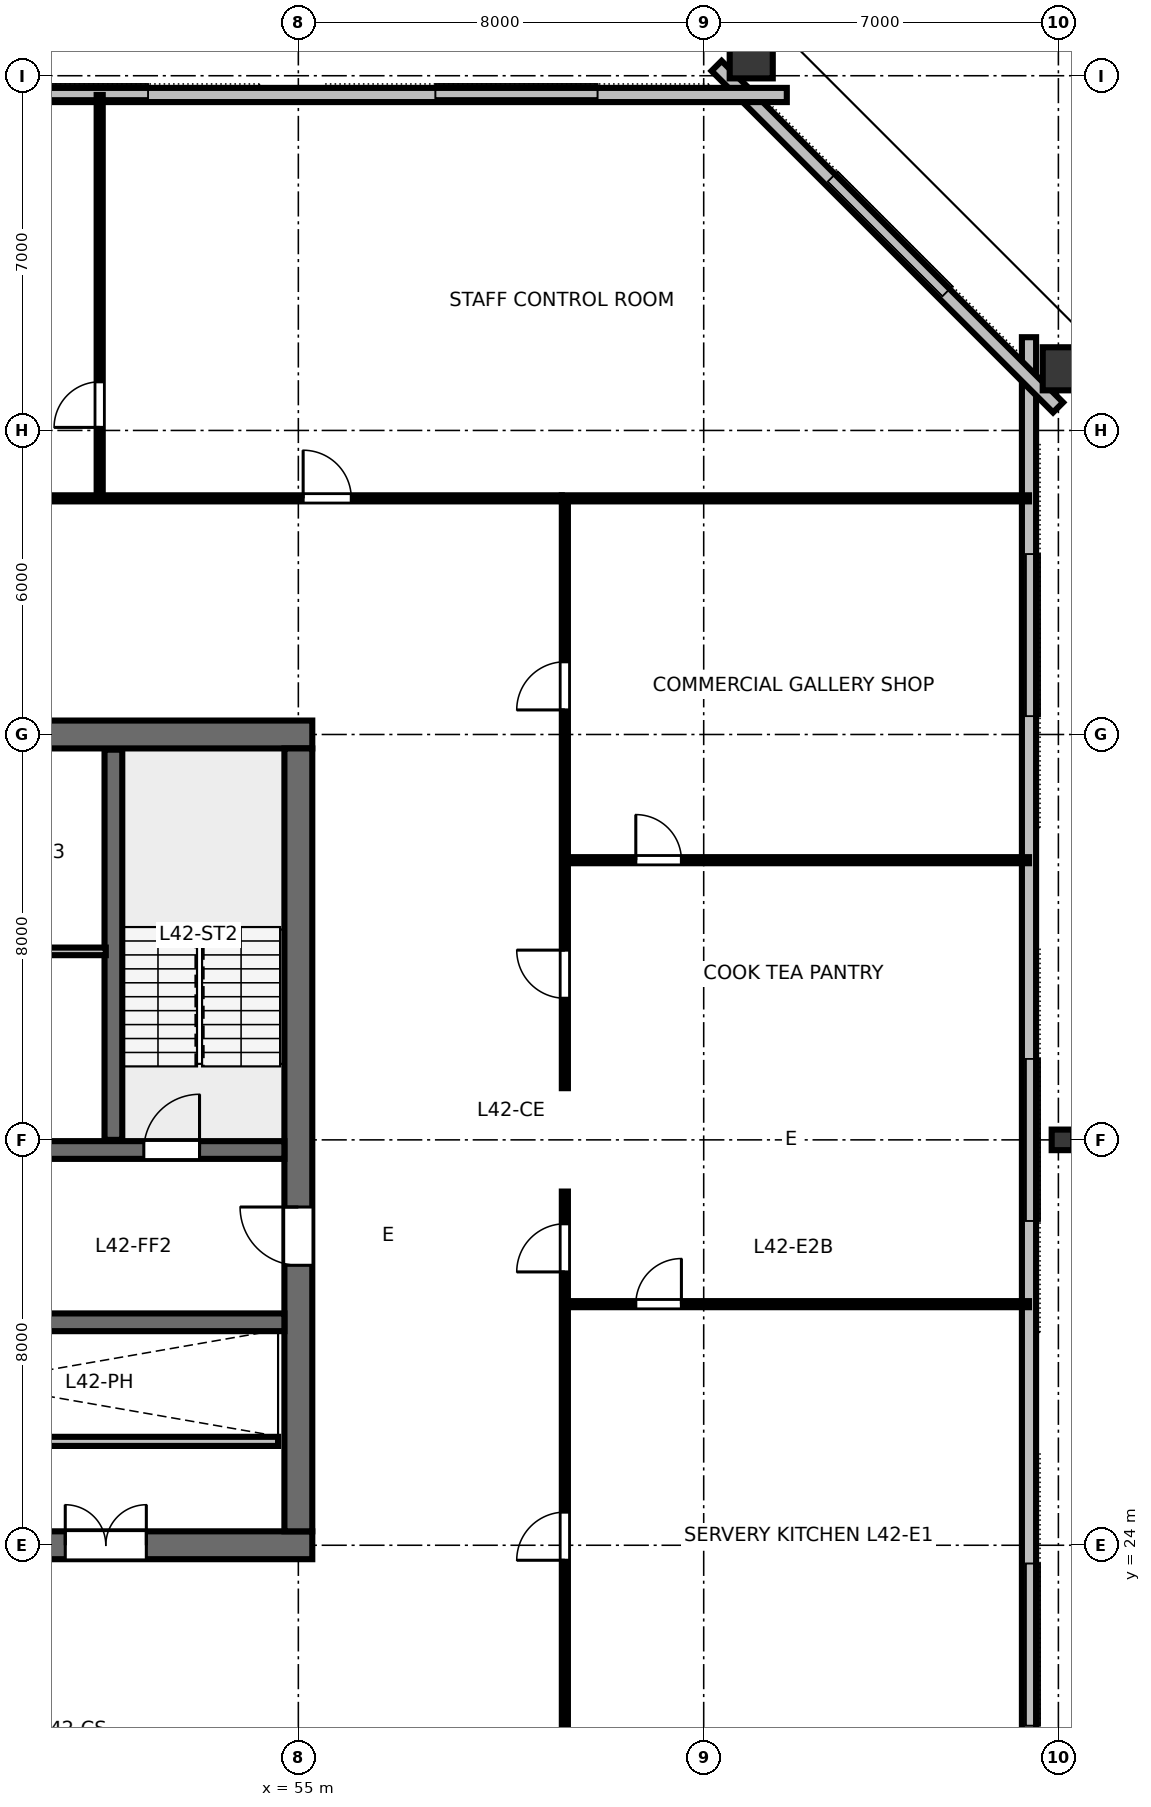
"""IFC4 building model, lengths in metres.
Left out: names, types, materials, properties, quantities, classifications, styles, units other than length and angle.
Written with IfcOpenShell. Run it as: python <this file> out.ifc"""

import sys

from ifc_helpers import new_model, si_unit, direction, frame, frame_2d, origin, origin_2d, place, context, subcontext, project, spatial, rectangle, hollow_rectangle, i_section, extrude, element, fill, save


model = new_model("IFC4")
c1 = context("Model", 3, precision=1e-05, world=origin(), true_north=direction((0.0, 1.0)))
c2 = subcontext(c1, "Body", "Model", "MODEL_VIEW")
j1 = project(units=[si_unit("LENGTHUNIT", "METRE"), si_unit("PLANEANGLEUNIT", "RADIAN")], contexts=[c1])
p1 = place(None, origin())
s1 = spatial("IfcSite", under=j1, at=p1, CompositionType="ELEMENT")
p2 = place(p1, origin())
s2 = spatial("IfcBuilding", under=s1, at=p2, CompositionType="ELEMENT")
p3 = place(p2, frame((0.0, 0.0, 160.0)))
s3 = spatial("IfcBuildingStorey", under=s2, at=p3, CompositionType="ELEMENT", Elevation=160.0)
p4 = place(p3, frame((36.725, 24.0, 0.0), z_axis=(0.0, 0.0, 1.0), x_axis=(1.0, 0.0, 0.0)))
e1 = element("IfcWall", 1, at=p4, inside=s3, PredefinedType="SHEAR", context=c2, shape_type="SweptSolid", body=[
    extrude(rectangle(XDim=18.55, YDim=0.55, at=frame_2d((9.275, 0.0))), origin(), (0.0, 0.0, 1.0), 3.36),
])
p5 = place(p4, frame((8.275, 0.0, 0.0)))
e2 = element("IfcOpeningElement", 2, at=p5, cuts=e1, PredefinedType="OPENING", context=c2, shape_type="SweptSolid", body=[
    extrude(rectangle(XDim=1.6, YDim=2.15, at=frame_2d((0.8, 1.075))), frame((0.0, 0.285, 0.0), z_axis=(0.0, -1.0, 0.0), x_axis=(1.0, 0.0, 0.0)), (0.0, 0.0, 1.0), 0.57),
])
p6 = place(p4, frame((13.675, 0.0, 0.0)))
e3 = element("IfcOpeningElement", 3, at=p6, cuts=e1, PredefinedType="OPENING", context=c2, shape_type="SweptSolid", body=[
    extrude(rectangle(XDim=1.6, YDim=2.15, at=frame_2d((0.8, 1.075))), frame((0.0, 0.285, 0.0), z_axis=(0.0, -1.0, 0.0), x_axis=(1.0, 0.0, 0.0)), (0.0, 0.0, 1.0), 0.57),
])
p7 = place(p3, frame((36.725, 40.0, 0.0), z_axis=(0.0, 0.0, 1.0), x_axis=(1.0, 0.0, 0.0)))
e4 = element("IfcWall", 4, at=p7, inside=s3, PredefinedType="SHEAR", context=c2, shape_type="SweptSolid", body=[
    extrude(rectangle(XDim=18.55, YDim=0.55, at=frame_2d((9.275, 0.0))), origin(), (0.0, 0.0, 1.0), 3.36),
])
p8 = place(p7, frame((8.775, 0.0, 0.0)))
e5 = element("IfcOpeningElement", 5, at=p8, cuts=e4, PredefinedType="OPENING", context=c2, shape_type="SweptSolid", body=[
    extrude(rectangle(XDim=1.0, YDim=2.15, at=frame_2d((0.5, 1.075))), frame((0.0, 0.285, 0.0), z_axis=(0.0, -1.0, 0.0), x_axis=(1.0, 0.0, 0.0)), (0.0, 0.0, 1.0), 0.57),
])
p9 = place(p3, frame((55.0, 24.275, 0.0), z_axis=(0.0, 0.0, 1.0), x_axis=(0.0, 1.0, 0.0)))
e6 = element("IfcWall", 6, at=p9, inside=s3, PredefinedType="SHEAR", context=c2, shape_type="SweptSolid", body=[
    extrude(rectangle(XDim=15.45, YDim=0.55, at=frame_2d((7.725, 0.0))), origin(), (0.0, 0.0, 1.0), 3.36),
])
p10 = place(p9, frame((5.25, 0.0, 0.0)))
e7 = element("IfcOpeningElement", 7, at=p10, cuts=e6, PredefinedType="OPENING", context=c2, shape_type="SweptSolid", body=[
    extrude(rectangle(XDim=1.15, YDim=2.15, at=frame_2d((0.575, 1.075))), frame((0.0, 0.285, 0.0), z_axis=(0.0, -1.0, 0.0), x_axis=(1.0, 0.0, 0.0)), (0.0, 0.0, 1.0), 0.57),
])
p11 = place(p3, frame((37.275, 31.8, 0.0), z_axis=(0.0, 0.0, 1.0), x_axis=(1.0, 0.0, 0.0)))
e8 = element("IfcWall", 8, at=p11, inside=s3, PredefinedType="SHEAR", context=c2, shape_type="SweptSolid", body=[
    extrude(rectangle(XDim=17.45, YDim=0.35, at=frame_2d((8.725, 0.0))), origin(), (0.0, 0.0, 1.0), 3.36),
])
p12 = place(p11, frame((0.775, 0.0, 0.0)))
e9 = element("IfcOpeningElement", 9, at=p12, cuts=e8, PredefinedType="OPENING", context=c2, shape_type="SweptSolid", body=[
    extrude(rectangle(XDim=1.1, YDim=2.15, at=frame_2d((0.55, 1.075))), frame((0.0, 0.185, 0.0), z_axis=(0.0, -1.0, 0.0), x_axis=(1.0, 0.0, 0.0)), (0.0, 0.0, 1.0), 0.37),
])
p13 = place(p11, frame((14.675, 0.0, 0.0)))
e10 = element("IfcOpeningElement", 10, at=p13, cuts=e8, PredefinedType="OPENING", context=c2, shape_type="SweptSolid", body=[
    extrude(rectangle(XDim=1.1, YDim=2.15, at=frame_2d((0.55, 1.075))), frame((0.0, 0.185, 0.0), z_axis=(0.0, -1.0, 0.0), x_axis=(1.0, 0.0, 0.0)), (0.0, 0.0, 1.0), 0.37),
])
p14 = place(p3, frame((37.275, 28.4, 0.0), z_axis=(0.0, 0.0, 1.0), x_axis=(1.0, 0.0, 0.0)))
e11 = element("IfcWall", 11, at=p14, inside=s3, PredefinedType="SHEAR", context=c2, shape_type="SweptSolid", body=[
    extrude(rectangle(XDim=17.45, YDim=0.35, at=frame_2d((8.725, 0.0))), origin(), (0.0, 0.0, 1.0), 3.36),
])
p15 = place(p3, frame((70.08, 32.0, 0.0), z_axis=(0.0, 0.0, 1.0), x_axis=(0.0, 1.0, 0.0)))
e12 = element("IfcColumn", 12, at=p15, inside=s3, PredefinedType="COLUMN", context=c2, shape_type="SweptSolid", body=[
    extrude(i_section(OverallWidth=0.406, OverallDepth=0.425, WebThickness=0.033, FlangeThickness=0.052, FilletRadius=0.025, at=origin_2d()), origin(), (0.0, 0.0, 1.0), 3.358),
])
for number, where, z_axis, x_axis in (
    (13, (70.19, 47.217, 0.0), (0.0, 0.0, 1.0), (0.0, 1.0, 0.0)),
    (14, (63.938, 53.448, 0.0), (0.0, 0.0, 1.0), (1.0, 0.0, 0.0)),
):
    element("IfcColumn", number, at=place(p3, frame(where, z_axis=z_axis, x_axis=x_axis)), inside=s3, PredefinedType="COLUMN", context=c2, shape_type="SweptSolid", body=[
        extrude(hollow_rectangle(XDim=0.85, YDim=1.0, WallThickness=0.05, at=origin_2d()), origin(), (0.0, 0.0, 1.0), 3.358),
    ])
p16 = place(p3, frame((69.42, 16.16, 0.0), z_axis=(0.0, 0.0, 1.0), x_axis=(0.0, 1.0, 0.0)))
e15 = element("IfcWall", 15, at=p16, inside=s3, PredefinedType="STANDARD", context=c2, shape_type="SweptSolid", body=[
    extrude(rectangle(XDim=31.68, YDim=0.28, at=frame_2d((15.84, 0.0))), origin(), (0.0, 0.0, 1.0), 3.36),
])
p17 = place(p3, frame((69.994, 46.455, 0.0), z_axis=(0.0, 0.0, 1.0), x_axis=(-0.707119588888, 0.707093973253, 0.0)))
e16 = element("IfcWall", 16, at=p17, inside=s3, PredefinedType="STANDARD", context=c2, shape_type="SweptSolid", body=[
    extrude(rectangle(XDim=9.531, YDim=0.28, at=frame_2d((4.766, 0.0))), origin(), (0.0, 0.0, 1.0), 3.36),
])
p18 = place(p3, frame((64.64, 52.62, 0.0), z_axis=(0.0, 0.0, 1.0), x_axis=(-1.0, 0.0, 0.0)))
e17 = element("IfcWall", 17, at=p18, inside=s3, PredefinedType="STANDARD", context=c2, shape_type="SweptSolid", body=[
    extrude(rectangle(XDim=37.28, YDim=0.28, at=frame_2d((18.64, 0.0))), origin(), (0.0, 0.0, 1.0), 3.36),
])
p19 = place(p3, frame((51.35, 32.0, 0.0), z_axis=(0.0, 0.0, 1.0), x_axis=(0.0, 1.0, 0.0)))
e18 = element("IfcWall", 18, at=p19, inside=s3, PredefinedType="SHEAR", context=c2, shape_type="SweptSolid", body=[
    extrude(rectangle(XDim=7.7, YDim=0.35, at=frame_2d((3.85, 0.0))), origin(), (0.0, 0.0, 1.0), 3.6),
])
p20 = place(p3, frame((40.8, 35.72, 0.0), z_axis=(0.0, 0.0, 1.0), x_axis=(1.0, 0.0, 0.0)))
e19 = element("IfcWall", 19, at=p20, inside=s3, PredefinedType="PARTITIONING", context=c2, shape_type="SweptSolid", body=[
    extrude(rectangle(XDim=10.4, YDim=0.15, at=frame_2d((5.2, 0.0))), origin(), (0.0, 0.0, 1.0), 3.36),
])
p21 = place(p20, frame((4.9, 0.0, 0.0)))
e20 = element("IfcOpeningElement", 20, at=p21, cuts=e19, PredefinedType="OPENING", context=c2, shape_type="SweptSolid", body=[
    extrude(rectangle(XDim=0.9, YDim=2.15, at=frame_2d((0.45, 1.075))), frame((0.0, 0.085, 0.0), z_axis=(0.0, -1.0, 0.0), x_axis=(1.0, 0.0, 0.0)), (0.0, 0.0, 1.0), 0.17),
])
p22 = place(p3, frame((42.55, 26.05, 0.0), z_axis=(0.0, 0.0, 1.0), x_axis=(1.0, 0.0, 0.0)))
e21 = element("IfcWall", 21, at=p22, inside=s3, PredefinedType="PARTITIONING", context=c2, shape_type="SweptSolid", body=[
    extrude(rectangle(XDim=12.05, YDim=0.18, at=frame_2d((6.025, 0.0))), origin(), (0.0, 0.0, 1.0), 3.36),
])
p23 = place(p22, frame((1.1, 0.0, 0.0)))
e22 = element("IfcOpeningElement", 22, at=p23, cuts=e21, PredefinedType="OPENING", context=c2, shape_type="SweptSolid", body=[
    extrude(rectangle(XDim=1.05, YDim=2.15, at=frame_2d((0.525, 1.075))), frame((0.0, 0.1, 0.0), z_axis=(0.0, -1.0, 0.0), x_axis=(1.0, 0.0, 0.0)), (0.0, 0.0, 1.0), 0.2),
])
p24 = place(p22, frame((3.0, 0.0, 0.0)))
e23 = element("IfcOpeningElement", 23, at=p24, cuts=e21, PredefinedType="OPENING", context=c2, shape_type="SweptSolid", body=[
    extrude(rectangle(XDim=1.05, YDim=2.15, at=frame_2d((0.525, 1.075))), frame((0.0, 0.1, 0.0), z_axis=(0.0, -1.0, 0.0), x_axis=(1.0, 0.0, 0.0)), (0.0, 0.0, 1.0), 0.2),
])
p25 = place(p3, frame((51.08, 44.66, 0.0), z_axis=(0.0, 0.0, 1.0), x_axis=(0.0, 1.0, 0.0)))
e24 = element("IfcWall", 24, at=p25, inside=s3, PredefinedType="PARTITIONING", context=c2, shape_type="SweptSolid", body=[
    extrude(rectangle(XDim=7.96, YDim=0.12, at=frame_2d((3.98, 0.0))), origin(), (0.0, 0.0, 1.0), 2.64),
])
p26 = place(p25, frame((1.4, 0.0, 0.0)))
e25 = element("IfcOpeningElement", 25, at=p26, cuts=e24, PredefinedType="OPENING", context=c2, shape_type="SweptSolid", body=[
    extrude(rectangle(XDim=0.9, YDim=2.15, at=frame_2d((0.45, 1.075))), frame((0.0, 0.07, 0.0), z_axis=(0.0, -1.0, 0.0), x_axis=(1.0, 0.0, 0.0)), (0.0, 0.0, 1.0), 0.14),
])
p27 = place(p3, frame((31.8, 44.66, 0.0), z_axis=(0.0, 0.0, 1.0), x_axis=(1.0, 0.0, 0.0)))
e26 = element("IfcWall", 26, at=p27, inside=s3, PredefinedType="PARTITIONING", context=c2, shape_type="SweptSolid", body=[
    extrude(rectangle(XDim=28.4, YDim=0.12, at=frame_2d((14.2, 0.0))), origin(), (0.0, 0.0, 1.0), 2.64),
])
p28 = place(p27, frame((3.03, 0.0, 0.0)))
e27 = element("IfcOpeningElement", 27, at=p28, cuts=e26, PredefinedType="OPENING", context=c2, shape_type="SweptSolid", body=[
    extrude(rectangle(XDim=0.95, YDim=2.15, at=frame_2d((0.475, 1.075))), frame((0.0, 0.07, 0.0), z_axis=(0.0, -1.0, 0.0), x_axis=(1.0, 0.0, 0.0)), (0.0, 0.0, 1.0), 0.14),
])
p29 = place(p27, frame((8.077, 0.0, 0.0)))
e28 = element("IfcOpeningElement", 28, at=p29, cuts=e26, PredefinedType="OPENING", context=c2, shape_type="SweptSolid", body=[
    extrude(rectangle(XDim=0.95, YDim=2.15, at=frame_2d((0.475, 1.075))), frame((0.0, 0.07, 0.0), z_axis=(0.0, -1.0, 0.0), x_axis=(1.0, 0.0, 0.0)), (0.0, 0.0, 1.0), 0.14),
])
p30 = place(p27, frame((12.396, 0.0, 0.0)))
e29 = element("IfcOpeningElement", 29, at=p30, cuts=e26, PredefinedType="OPENING", context=c2, shape_type="SweptSolid", body=[
    extrude(rectangle(XDim=0.95, YDim=2.15, at=frame_2d((0.475, 1.075))), frame((0.0, 0.07, 0.0), z_axis=(0.0, -1.0, 0.0), x_axis=(1.0, 0.0, 0.0)), (0.0, 0.0, 1.0), 0.14),
])
p31 = place(p27, frame((16.918, 0.0, 0.0)))
e30 = element("IfcOpeningElement", 30, at=p31, cuts=e26, PredefinedType="OPENING", context=c2, shape_type="SweptSolid", body=[
    extrude(rectangle(XDim=0.95, YDim=2.15, at=frame_2d((0.475, 1.075))), frame((0.0, 0.07, 0.0), z_axis=(0.0, -1.0, 0.0), x_axis=(1.0, 0.0, 0.0)), (0.0, 0.0, 1.0), 0.14),
])
p32 = place(p27, frame((23.295, 0.0, 0.0)))
e31 = element("IfcOpeningElement", 31, at=p32, cuts=e26, PredefinedType="OPENING", context=c2, shape_type="SweptSolid", body=[
    extrude(rectangle(XDim=0.95, YDim=2.15, at=frame_2d((0.475, 1.075))), frame((0.0, 0.07, 0.0), z_axis=(0.0, -1.0, 0.0), x_axis=(1.0, 0.0, 0.0)), (0.0, 0.0, 1.0), 0.14),
])
p33 = place(p3, frame((60.26, 28.758, 0.0), z_axis=(0.0, 0.0, 1.0), x_axis=(1.0, 0.0, 0.0)))
e32 = element("IfcWall", 32, at=p33, inside=s3, PredefinedType="PARTITIONING", context=c2, shape_type="SweptSolid", body=[
    extrude(rectangle(XDim=9.16, YDim=0.12, at=frame_2d((4.58, 0.0))), origin(), (0.0, 0.0, 1.0), 2.64),
])
p34 = place(p33, frame((1.4, 0.0, 0.0)))
e33 = element("IfcOpeningElement", 33, at=p34, cuts=e32, PredefinedType="OPENING", context=c2, shape_type="SweptSolid", body=[
    extrude(rectangle(XDim=0.9, YDim=2.15, at=frame_2d((0.45, 1.075))), frame((0.0, 0.07, 0.0), z_axis=(0.0, -1.0, 0.0), x_axis=(1.0, 0.0, 0.0)), (0.0, 0.0, 1.0), 0.14),
])
p35 = place(p3, frame((60.26, 37.519, 0.0), z_axis=(0.0, 0.0, 1.0), x_axis=(1.0, 0.0, 0.0)))
e34 = element("IfcWall", 34, at=p35, inside=s3, PredefinedType="PARTITIONING", context=c2, shape_type="SweptSolid", body=[
    extrude(rectangle(XDim=9.16, YDim=0.12, at=frame_2d((4.58, 0.0))), origin(), (0.0, 0.0, 1.0), 2.64),
])
p36 = place(p35, frame((1.4, 0.0, 0.0)))
e35 = element("IfcOpeningElement", 35, at=p36, cuts=e34, PredefinedType="OPENING", context=c2, shape_type="SweptSolid", body=[
    extrude(rectangle(XDim=0.9, YDim=2.15, at=frame_2d((0.45, 1.075))), frame((0.0, 0.07, 0.0), z_axis=(0.0, -1.0, 0.0), x_axis=(1.0, 0.0, 0.0)), (0.0, 0.0, 1.0), 0.14),
])
p37 = place(p3, frame((60.26, 19.4, 0.0), z_axis=(0.0, 0.0, 1.0), x_axis=(0.0, 1.0, 0.0)))
e36 = element("IfcWall", 36, at=p37, inside=s3, PredefinedType="PARTITIONING", context=c2, shape_type="SweptSolid", body=[
    extrude(rectangle(XDim=11.58, YDim=0.12, at=frame_2d((5.79, 0.0))), origin(), (0.0, 0.0, 1.0), 2.64),
])
p38 = place(p37, frame((4.304, 0.0, 0.0)))
e37 = element("IfcOpeningElement", 37, at=p38, cuts=e36, PredefinedType="OPENING", context=c2, shape_type="SweptSolid", body=[
    extrude(rectangle(XDim=0.95, YDim=2.15, at=frame_2d((0.475, 1.075))), frame((0.0, 0.07, 0.0), z_axis=(0.0, -1.0, 0.0), x_axis=(1.0, 0.0, 0.0)), (0.0, 0.0, 1.0), 0.14),
])
p39 = place(p37, frame((9.994, 0.0, 0.0)))
e38 = element("IfcOpeningElement", 38, at=p39, cuts=e36, PredefinedType="OPENING", context=c2, shape_type="SweptSolid", body=[
    extrude(rectangle(XDim=0.95, YDim=2.15, at=frame_2d((0.475, 1.075))), frame((0.0, 0.07, 0.0), z_axis=(0.0, -1.0, 0.0), x_axis=(1.0, 0.0, 0.0)), (0.0, 0.0, 1.0), 0.14),
])
p40 = place(p3, frame((60.26, 33.02, 0.0), z_axis=(0.0, 0.0, 1.0), x_axis=(0.0, 1.0, 0.0)))
e39 = element("IfcWall", 39, at=p40, inside=s3, PredefinedType="PARTITIONING", context=c2, shape_type="SweptSolid", body=[
    extrude(rectangle(XDim=11.58, YDim=0.12, at=frame_2d((5.79, 0.0))), origin(), (0.0, 0.0, 1.0), 2.64),
])
p41 = place(p40, frame((1.775, 0.0, 0.0)))
e40 = element("IfcOpeningElement", 40, at=p41, cuts=e39, PredefinedType="OPENING", context=c2, shape_type="SweptSolid", body=[
    extrude(rectangle(XDim=0.95, YDim=2.15, at=frame_2d((0.475, 1.075))), frame((0.0, 0.07, 0.0), z_axis=(0.0, -1.0, 0.0), x_axis=(1.0, 0.0, 0.0)), (0.0, 0.0, 1.0), 0.14),
])
p42 = place(p40, frame((7.465, 0.0, 0.0)))
e41 = element("IfcOpeningElement", 41, at=p42, cuts=e39, PredefinedType="OPENING", context=c2, shape_type="SweptSolid", body=[
    extrude(rectangle(XDim=0.95, YDim=2.15, at=frame_2d((0.475, 1.075))), frame((0.0, 0.07, 0.0), z_axis=(0.0, -1.0, 0.0), x_axis=(1.0, 0.0, 0.0)), (0.0, 0.0, 1.0), 0.14),
])
p43 = place(p3, frame((60.2, 44.66, 0.0), z_axis=(0.0, 0.0, 1.0), x_axis=(1.0, 0.0, 0.0)))
e42 = element("IfcWall", 42, at=p43, inside=s3, PredefinedType="PARTITIONING", context=c2, shape_type="SweptSolid", body=[
    extrude(rectangle(XDim=9.22, YDim=0.12, at=frame_2d((4.61, 0.0))), origin(), (0.0, 0.0, 1.0), 2.64),
])
p44 = place(p13, origin())
e43 = element("IfcDoor", 43, at=p44, inside=s3, OperationType="SINGLE_SWING_RIGHT", PredefinedType="DOOR", context=c2, shape_type="SweptSolid", body=[
    extrude(rectangle(XDim=1.1, YDim=2.15, at=frame_2d((0.55, 1.075))), frame((0.0, 0.025, 0.0), z_axis=(0.0, -1.0, 0.0), x_axis=(1.0, 0.0, 0.0)), (0.0, 0.0, 1.0), 0.05),
])
fill(e10, e43)
p45 = place(p10, origin())
e44 = element("IfcDoor", 44, at=p45, inside=s3, OperationType="SINGLE_SWING_RIGHT", PredefinedType="DOOR", context=c2, shape_type="SweptSolid", body=[
    extrude(rectangle(XDim=1.15, YDim=2.15, at=frame_2d((0.575, 1.075))), frame((0.0, 0.025, 0.0), z_axis=(0.0, -1.0, 0.0), x_axis=(1.0, 0.0, 0.0)), (0.0, 0.0, 1.0), 0.05),
])
fill(e7, e44)
p46 = place(p6, origin())
e45 = element("IfcDoor", 45, at=p46, inside=s3, OperationType="DOUBLE_DOOR_SINGLE_SWING", PredefinedType="DOOR", context=c2, shape_type="SweptSolid", body=[
    extrude(rectangle(XDim=1.6, YDim=2.15, at=frame_2d((0.8, 1.075))), frame((0.0, 0.025, 0.0), z_axis=(0.0, -1.0, 0.0), x_axis=(1.0, 0.0, 0.0)), (0.0, 0.0, 1.0), 0.05),
])
fill(e3, e45)
p47 = place(p26, origin())
e46 = element("IfcDoor", 46, at=p47, inside=s3, OperationType="SINGLE_SWING_LEFT", PredefinedType="DOOR", context=c2, shape_type="SweptSolid", body=[
    extrude(rectangle(XDim=0.9, YDim=2.15, at=frame_2d((0.45, 1.075))), frame((0.0, 0.025, 0.0), z_axis=(0.0, -1.0, 0.0), x_axis=(1.0, 0.0, 0.0)), (0.0, 0.0, 1.0), 0.05),
])
fill(e25, e46)
p48 = place(p32, origin())
e47 = element("IfcDoor", 47, at=p48, inside=s3, OperationType="SINGLE_SWING_LEFT", PredefinedType="DOOR", context=c2, shape_type="SweptSolid", body=[
    extrude(rectangle(XDim=0.95, YDim=2.15, at=frame_2d((0.475, 1.075))), frame((0.0, 0.025, 0.0), z_axis=(0.0, -1.0, 0.0), x_axis=(1.0, 0.0, 0.0)), (0.0, 0.0, 1.0), 0.05),
])
fill(e31, e47)
p49 = place(p34, origin())
e48 = element("IfcDoor", 48, at=p49, inside=s3, OperationType="SINGLE_SWING_RIGHT", PredefinedType="DOOR", context=c2, shape_type="SweptSolid", body=[
    extrude(rectangle(XDim=0.9, YDim=2.15, at=frame_2d((0.45, 1.075))), frame((0.0, 0.025, 0.0), z_axis=(0.0, -1.0, 0.0), x_axis=(1.0, 0.0, 0.0)), (0.0, 0.0, 1.0), 0.05),
])
fill(e33, e48)
p50 = place(p36, origin())
e49 = element("IfcDoor", 49, at=p50, inside=s3, OperationType="SINGLE_SWING_LEFT", PredefinedType="DOOR", context=c2, shape_type="SweptSolid", body=[
    extrude(rectangle(XDim=0.9, YDim=2.15, at=frame_2d((0.45, 1.075))), frame((0.0, 0.025, 0.0), z_axis=(0.0, -1.0, 0.0), x_axis=(1.0, 0.0, 0.0)), (0.0, 0.0, 1.0), 0.05),
])
fill(e35, e49)
p51 = place(p38, origin())
e50 = element("IfcDoor", 50, at=p51, inside=s3, OperationType="SINGLE_SWING_LEFT", PredefinedType="DOOR", context=c2, shape_type="SweptSolid", body=[
    extrude(rectangle(XDim=0.95, YDim=2.15, at=frame_2d((0.475, 1.075))), frame((0.0, 0.025, 0.0), z_axis=(0.0, -1.0, 0.0), x_axis=(1.0, 0.0, 0.0)), (0.0, 0.0, 1.0), 0.05),
])
fill(e37, e50)
p52 = place(p39, origin())
e51 = element("IfcDoor", 51, at=p52, inside=s3, OperationType="SINGLE_SWING_LEFT", PredefinedType="DOOR", context=c2, shape_type="SweptSolid", body=[
    extrude(rectangle(XDim=0.95, YDim=2.15, at=frame_2d((0.475, 1.075))), frame((0.0, 0.025, 0.0), z_axis=(0.0, -1.0, 0.0), x_axis=(1.0, 0.0, 0.0)), (0.0, 0.0, 1.0), 0.05),
])
fill(e38, e51)
p53 = place(p41, origin())
e52 = element("IfcDoor", 52, at=p53, inside=s3, OperationType="SINGLE_SWING_RIGHT", PredefinedType="DOOR", context=c2, shape_type="SweptSolid", body=[
    extrude(rectangle(XDim=0.95, YDim=2.15, at=frame_2d((0.475, 1.075))), frame((0.0, 0.025, 0.0), z_axis=(0.0, -1.0, 0.0), x_axis=(1.0, 0.0, 0.0)), (0.0, 0.0, 1.0), 0.05),
])
fill(e40, e52)
p54 = place(p42, origin())
e53 = element("IfcDoor", 53, at=p54, inside=s3, OperationType="SINGLE_SWING_LEFT", PredefinedType="DOOR", context=c2, shape_type="SweptSolid", body=[
    extrude(rectangle(XDim=0.95, YDim=2.15, at=frame_2d((0.475, 1.075))), frame((0.0, 0.025, 0.0), z_axis=(0.0, -1.0, 0.0), x_axis=(1.0, 0.0, 0.0)), (0.0, 0.0, 1.0), 0.05),
])
fill(e41, e53)
save(model, sys.argv[1])
